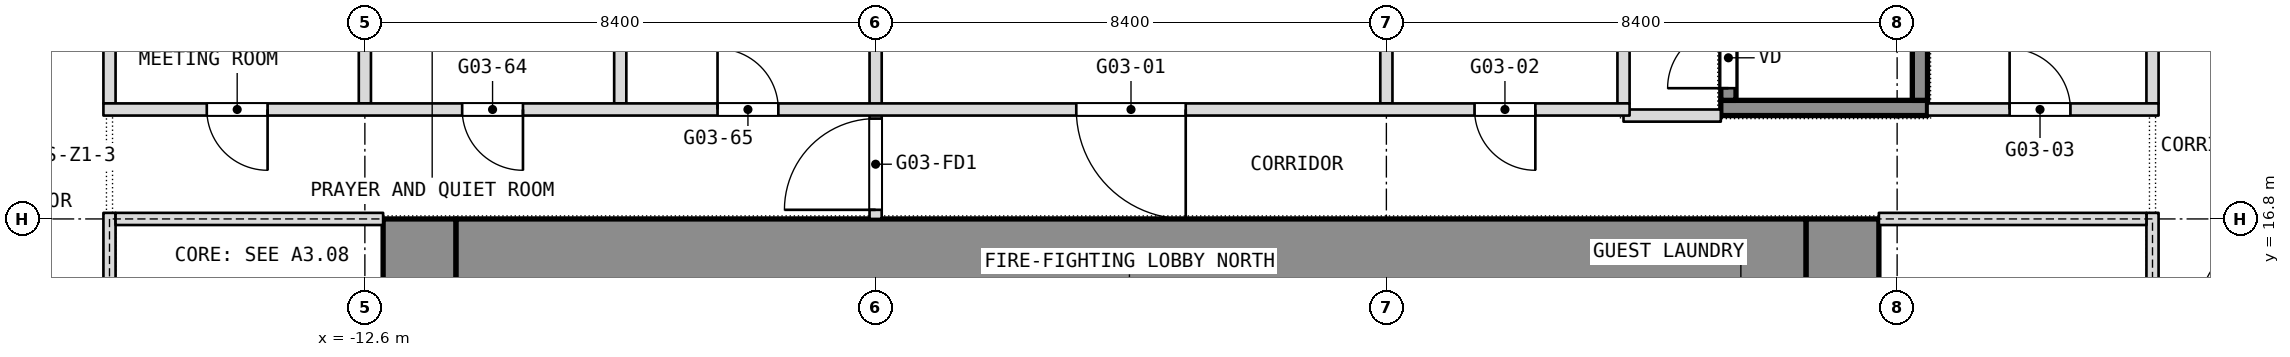
"""IFC4 building model, lengths in metres.
Left out: names, types, materials, properties, quantities, classifications, styles, units other than length and angle.
Written with IfcOpenShell. Run it as: python <this file> out.ifc"""

import sys

from ifc_helpers import new_model, si_unit, direction, frame, frame_2d, origin, place, context, subcontext, project, spatial, rectangle, extrude, element, fill, save


model = new_model("IFC4")
c1 = context("Model", 3, precision=1e-05, world=origin(), true_north=direction((0.0, 1.0)))
c2 = subcontext(c1, "Body", "Model", "MODEL_VIEW")
j1 = project(units=[si_unit("LENGTHUNIT", "METRE"), si_unit("PLANEANGLEUNIT", "RADIAN")], contexts=[c1])
p1 = place(None, origin())
s1 = spatial("IfcSite", under=j1, at=p1, CompositionType="ELEMENT")
p2 = place(p1, origin())
s2 = spatial("IfcBuilding", under=s1, at=p2, CompositionType="ELEMENT")
p3 = place(p2, frame((0.0, 0.0, 50.9)))
s3 = spatial("IfcBuildingStorey", under=s2, at=p3, CompositionType="ELEMENT", Elevation=50.9)
p4 = place(p3, frame((11.7, 0.0, 0.0), z_axis=(0.0, 0.0, 1.0), x_axis=(0.0, 1.0, 0.0)))
e1 = element("IfcWall", 1, at=p4, inside=s3, PredefinedType="SHEAR", context=c2, shape_type="SweptSolid", body=[
    extrude(rectangle(XDim=16.8, YDim=1.2, at=frame_2d((8.4, 0.0))), origin(), (0.0, 0.0, 1.0), 3.6),
])
p5 = place(p4, frame((3.6, 0.0, 0.0)))
e2 = element("IfcOpeningElement", 2, at=p5, cuts=e1, PredefinedType="OPENING", context=c2, shape_type="SweptSolid", body=[
    extrude(rectangle(XDim=0.9, YDim=2.1, at=frame_2d((0.45, 1.05))), frame((0.0, 0.6, 0.0), z_axis=(0.0, -1.0, 0.0), x_axis=(1.0, 0.0, 0.0)), (0.0, 0.0, 1.0), 1.2),
])
p6 = place(p4, frame((6.825, 0.0, 0.0)))
e3 = element("IfcOpeningElement", 3, at=p6, cuts=e1, PredefinedType="OPENING", context=c2, shape_type="SweptSolid", body=[
    extrude(rectangle(XDim=1.2, YDim=2.1, at=frame_2d((0.6, 1.05))), frame((0.0, 0.6, 0.0), z_axis=(0.0, -1.0, 0.0), x_axis=(1.0, 0.0, 0.0)), (0.0, 0.0, 1.0), 1.2),
])
p7 = place(p4, frame((12.3, 0.0, 0.0)))
e4 = element("IfcOpeningElement", 4, at=p7, cuts=e1, PredefinedType="OPENING", context=c2, shape_type="SweptSolid", body=[
    extrude(rectangle(XDim=0.9, YDim=2.1, at=frame_2d((0.45, 1.05))), frame((0.0, 0.6, 0.0), z_axis=(0.0, -1.0, 0.0), x_axis=(1.0, 0.0, 0.0)), (0.0, 0.0, 1.0), 1.2),
])
p8 = place(p4, frame((8.775, 0.0, 0.0)))
e5 = element("IfcOpeningElement", 5, at=p8, cuts=e1, PredefinedType="OPENING", context=c2, shape_type="SweptSolid", body=[
    extrude(rectangle(XDim=1.2, YDim=2.1, at=frame_2d((0.6, 1.05))), frame((0.0, 0.6, 0.0), z_axis=(0.0, -1.0, 0.0), x_axis=(1.0, 0.0, 0.0)), (0.0, 0.0, 1.0), 1.2),
])
p9 = place(p3, frame((-11.7, 0.0, 0.0), z_axis=(0.0, 0.0, 1.0), x_axis=(0.0, 1.0, 0.0)))
e6 = element("IfcWall", 6, at=p9, inside=s3, PredefinedType="SHEAR", context=c2, shape_type="SweptSolid", body=[
    extrude(rectangle(XDim=16.8, YDim=1.2, at=frame_2d((8.4, 0.0))), origin(), (0.0, 0.0, 1.0), 3.6),
])
p10 = place(p9, frame((2.3, 0.0, 0.0)))
e7 = element("IfcOpeningElement", 7, at=p10, cuts=e6, PredefinedType="OPENING", context=c2, shape_type="SweptSolid", body=[
    extrude(rectangle(XDim=1.1, YDim=2.1, at=frame_2d((0.55, 1.05))), frame((0.0, 0.6, 0.0), z_axis=(0.0, -1.0, 0.0), x_axis=(1.0, 0.0, 0.0)), (0.0, 0.0, 1.0), 1.2),
])
p11 = place(p9, frame((4.85, 0.0, 0.0)))
e8 = element("IfcOpeningElement", 8, at=p11, cuts=e6, PredefinedType="OPENING", context=c2, shape_type="SweptSolid", body=[
    extrude(rectangle(XDim=1.1, YDim=2.1, at=frame_2d((0.55, 1.05))), frame((0.0, 0.6, 0.0), z_axis=(0.0, -1.0, 0.0), x_axis=(1.0, 0.0, 0.0)), (0.0, 0.0, 1.0), 1.2),
])
p12 = place(p9, frame((6.825, 0.0, 0.0)))
e9 = element("IfcOpeningElement", 9, at=p12, cuts=e6, PredefinedType="OPENING", context=c2, shape_type="SweptSolid", body=[
    extrude(rectangle(XDim=1.2, YDim=2.1, at=frame_2d((0.6, 1.05))), frame((0.0, 0.6, 0.0), z_axis=(0.0, -1.0, 0.0), x_axis=(1.0, 0.0, 0.0)), (0.0, 0.0, 1.0), 1.2),
])
p13 = place(p9, frame((13.4, 0.0, 0.0)))
e10 = element("IfcOpeningElement", 10, at=p13, cuts=e6, PredefinedType="OPENING", context=c2, shape_type="SweptSolid", body=[
    extrude(rectangle(XDim=1.1, YDim=2.1, at=frame_2d((0.55, 1.05))), frame((0.0, 0.6, 0.0), z_axis=(0.0, -1.0, 0.0), x_axis=(1.0, 0.0, 0.0)), (0.0, 0.0, 1.0), 1.2),
])
p14 = place(p9, frame((10.85, 0.0, 0.0)))
e11 = element("IfcOpeningElement", 11, at=p14, cuts=e6, PredefinedType="OPENING", context=c2, shape_type="SweptSolid", body=[
    extrude(rectangle(XDim=1.1, YDim=2.1, at=frame_2d((0.55, 1.05))), frame((0.0, 0.6, 0.0), z_axis=(0.0, -1.0, 0.0), x_axis=(1.0, 0.0, 0.0)), (0.0, 0.0, 1.0), 1.2),
])
p15 = place(p9, frame((8.775, 0.0, 0.0)))
e12 = element("IfcOpeningElement", 12, at=p15, cuts=e6, PredefinedType="OPENING", context=c2, shape_type="SweptSolid", body=[
    extrude(rectangle(XDim=1.2, YDim=2.1, at=frame_2d((0.6, 1.05))), frame((0.0, 0.6, 0.0), z_axis=(0.0, -1.0, 0.0), x_axis=(1.0, 0.0, 0.0)), (0.0, 0.0, 1.0), 1.2),
])
p16 = place(p3, frame((-11.1, 16.2, 0.0), z_axis=(0.0, 0.0, 1.0), x_axis=(1.0, 0.0, 0.0)))
e13 = element("IfcWall", 13, at=p16, inside=s3, PredefinedType="SHEAR", context=c2, shape_type="SweptSolid", body=[
    extrude(rectangle(XDim=22.2, YDim=1.2, at=frame_2d((11.1, 0.0))), origin(), (0.0, 0.0, 1.0), 3.6),
])
p17 = place(p3, frame((16.8, 18.7, 0.0), z_axis=(0.0, 0.0, 1.0), x_axis=(0.0, 1.0, 0.0)))
e14 = element("IfcWall", 14, at=p17, inside=s3, PredefinedType="PARTITIONING", context=c2, shape_type="SweptSolid", body=[
    extrude(rectangle(XDim=3.0, YDim=0.2, at=frame_2d((1.5, 0.0))), origin(), (0.0, 0.0, 1.0), 3.34),
])
for number, where, z_axis, x_axis in (
    (15, (8.1, 18.7, 0.0), (0.0, 0.0, 1.0), (0.0, 1.0, 0.0)),
    (16, (4.2, 18.7, 0.0), (0.0, 0.0, 1.0), (0.0, 1.0, 0.0)),
):
    element("IfcWall", number, at=place(p3, frame(where, z_axis=z_axis, x_axis=x_axis)), inside=s3, PredefinedType="PARTITIONING", context=c2, shape_type="SweptSolid", body=[
        extrude(rectangle(XDim=2.8, YDim=0.2, at=frame_2d((1.4, 0.0))), origin(), (0.0, 0.0, 1.0), 3.34),
    ])
p18 = place(p3, frame((-4.2, 16.8, 0.0), z_axis=(0.0, 0.0, 1.0), x_axis=(0.0, 1.0, 0.0)))
e17 = element("IfcWall", 17, at=p18, inside=s3, PredefinedType="PARTITIONING", context=c2, shape_type="SweptSolid", body=[
    extrude(rectangle(XDim=6.7, YDim=0.2, at=frame_2d((3.35, 0.0))), origin(), (0.0, 0.0, 1.0), 3.34),
])
p19 = place(p18, frame((0.15, 0.0, 0.0)))
e18 = element("IfcOpeningElement", 18, at=p19, cuts=e17, PredefinedType="OPENING", context=c2, shape_type="SweptSolid", body=[
    extrude(rectangle(XDim=1.5, YDim=2.1, at=frame_2d((0.75, 1.05))), frame((0.0, 0.1, 0.0), z_axis=(0.0, -1.0, 0.0), x_axis=(1.0, 0.0, 0.0)), (0.0, 0.0, 1.0), 0.2),
])
p20 = place(p18, frame((4.95, 0.0, 0.0)))
e19 = element("IfcOpeningElement", 19, at=p20, cuts=e17, PredefinedType="OPENING", context=c2, shape_type="SweptSolid", body=[
    extrude(rectangle(XDim=1.5, YDim=2.1, at=frame_2d((0.75, 1.05))), frame((0.0, 0.1, 0.0), z_axis=(0.0, -1.0, 0.0), x_axis=(1.0, 0.0, 0.0)), (0.0, 0.0, 1.0), 0.2),
])
for number, where, z_axis, x_axis in (
    (20, (-8.4, 18.7, 0.0), (0.0, 0.0, 1.0), (0.0, 1.0, 0.0)),
    (21, (-12.6, 18.7, 0.0), (0.0, 0.0, 1.0), (0.0, 1.0, 0.0)),
):
    element("IfcWall", number, at=place(p3, frame(where, z_axis=z_axis, x_axis=x_axis)), inside=s3, PredefinedType="PARTITIONING", context=c2, shape_type="SweptSolid", body=[
        extrude(rectangle(XDim=2.8, YDim=0.2, at=frame_2d((1.4, 0.0))), origin(), (0.0, 0.0, 1.0), 3.34),
    ])
p21 = place(p3, frame((-16.8, 18.7, 0.0), z_axis=(0.0, 0.0, 1.0), x_axis=(0.0, 1.0, 0.0)))
e22 = element("IfcWall", 22, at=p21, inside=s3, PredefinedType="PARTITIONING", context=c2, shape_type="SweptSolid", body=[
    extrude(rectangle(XDim=3.0, YDim=0.2, at=frame_2d((1.5, 0.0))), origin(), (0.0, 0.0, 1.0), 3.34),
])
p22 = place(p3, frame((8.1, 18.5, 0.0), z_axis=(0.0, 0.0, 1.0), x_axis=(1.0, 0.0, 0.0)))
e23 = element("IfcWall", 23, at=p22, inside=s3, PredefinedType="PARTITIONING", context=c2, shape_type="SweptSolid", body=[
    extrude(rectangle(XDim=1.6, YDim=0.2, at=frame_2d((0.8, 0.0))), origin(), (0.0, 0.0, 1.0), 3.34),
])
p23 = place(p3, frame((-16.9, 18.6, 0.0), z_axis=(0.0, 0.0, 1.0), x_axis=(1.0, 0.0, 0.0)))
e24 = element("IfcWall", 24, at=p23, inside=s3, PredefinedType="PARTITIONING", context=c2, shape_type="SweptSolid", body=[
    extrude(rectangle(XDim=25.1, YDim=0.2, at=frame_2d((12.55, 0.0))), origin(), (0.0, 0.0, 1.0), 3.34),
])
p24 = place(p23, frame((16.0, 0.0, 0.0)))
e25 = element("IfcOpeningElement", 25, at=p24, cuts=e24, PredefinedType="OPENING", context=c2, shape_type="SweptSolid", body=[
    extrude(rectangle(XDim=1.8, YDim=2.1, at=frame_2d((0.9, 1.05))), frame((0.0, 0.1, 0.0), z_axis=(0.0, -1.0, 0.0), x_axis=(1.0, 0.0, 0.0)), (0.0, 0.0, 1.0), 0.2),
])
p25 = place(p23, frame((22.55, 0.0, 0.0)))
e26 = element("IfcOpeningElement", 26, at=p25, cuts=e24, PredefinedType="OPENING", context=c2, shape_type="SweptSolid", body=[
    extrude(rectangle(XDim=1.0, YDim=2.1, at=frame_2d((0.5, 1.05))), frame((0.0, 0.1, 0.0), z_axis=(0.0, -1.0, 0.0), x_axis=(1.0, 0.0, 0.0)), (0.0, 0.0, 1.0), 0.2),
])
p26 = place(p23, frame((5.9, 0.0, 0.0)))
e27 = element("IfcOpeningElement", 27, at=p26, cuts=e24, PredefinedType="OPENING", context=c2, shape_type="SweptSolid", body=[
    extrude(rectangle(XDim=1.0, YDim=2.1, at=frame_2d((0.5, 1.05))), frame((0.0, 0.1, 0.0), z_axis=(0.0, -1.0, 0.0), x_axis=(1.0, 0.0, 0.0)), (0.0, 0.0, 1.0), 0.2),
])
p27 = place(p23, frame((10.1, 0.0, 0.0)))
e28 = element("IfcOpeningElement", 28, at=p27, cuts=e24, PredefinedType="OPENING", context=c2, shape_type="SweptSolid", body=[
    extrude(rectangle(XDim=1.0, YDim=2.1, at=frame_2d((0.5, 1.05))), frame((0.0, 0.1, 0.0), z_axis=(0.0, -1.0, 0.0), x_axis=(1.0, 0.0, 0.0)), (0.0, 0.0, 1.0), 0.2),
])
p28 = place(p23, frame((1.7, 0.0, 0.0)))
e29 = element("IfcOpeningElement", 29, at=p28, cuts=e24, PredefinedType="OPENING", context=c2, shape_type="SweptSolid", body=[
    extrude(rectangle(XDim=1.0, YDim=2.1, at=frame_2d((0.5, 1.05))), frame((0.0, 0.1, 0.0), z_axis=(0.0, -1.0, 0.0), x_axis=(1.0, 0.0, 0.0)), (0.0, 0.0, 1.0), 0.2),
])
p29 = place(p3, frame((13.1, 18.6, 0.0), z_axis=(0.0, 0.0, 1.0), x_axis=(1.0, 0.0, 0.0)))
e30 = element("IfcWall", 30, at=p29, inside=s3, PredefinedType="PARTITIONING", context=c2, shape_type="SweptSolid", body=[
    extrude(rectangle(XDim=3.8, YDim=0.2, at=frame_2d((1.9, 0.0))), origin(), (0.0, 0.0, 1.0), 3.34),
])
p30 = place(p29, frame((1.35, 0.0, 0.0)))
e31 = element("IfcOpeningElement", 31, at=p30, cuts=e30, PredefinedType="OPENING", context=c2, shape_type="SweptSolid", body=[
    extrude(rectangle(XDim=1.0, YDim=2.1, at=frame_2d((0.5, 1.05))), frame((0.0, 0.1, 0.0), z_axis=(0.0, -1.0, 0.0), x_axis=(1.0, 0.0, 0.0)), (0.0, 0.0, 1.0), 0.2),
])
p31 = place(p3, frame((-16.8, -0.1, 0.0), z_axis=(0.0, 0.0, 1.0), x_axis=(0.0, 1.0, 0.0)))
e32 = element("IfcWall", 32, at=p31, inside=s3, PredefinedType="PARTITIONING", context=c2, shape_type="SweptSolid", body=[
    extrude(rectangle(XDim=17.0, YDim=0.2, at=frame_2d((8.5, 0.0))), origin(), (0.0, 0.0, 1.0), 3.34),
])
p32 = place(p31, frame((2.2, 0.0, 0.0)))
e33 = element("IfcOpeningElement", 33, at=p32, cuts=e32, PredefinedType="OPENING", context=c2, shape_type="SweptSolid", body=[
    extrude(rectangle(XDim=1.8, YDim=2.1, at=frame_2d((0.9, 1.05))), frame((0.0, 0.1, 0.0), z_axis=(0.0, -1.0, 0.0), x_axis=(1.0, 0.0, 0.0)), (0.0, 0.0, 1.0), 0.2),
])
p33 = place(p31, frame((7.2, 0.0, 0.0)))
e34 = element("IfcOpeningElement", 34, at=p33, cuts=e32, PredefinedType="OPENING", context=c2, shape_type="SweptSolid", body=[
    extrude(rectangle(XDim=1.8, YDim=2.1, at=frame_2d((0.9, 1.05))), frame((0.0, 0.1, 0.0), z_axis=(0.0, -1.0, 0.0), x_axis=(1.0, 0.0, 0.0)), (0.0, 0.0, 1.0), 0.2),
])
p34 = place(p3, frame((-16.7, 16.8, 0.0), z_axis=(0.0, 0.0, 1.0), x_axis=(1.0, 0.0, 0.0)))
e35 = element("IfcWall", 35, at=p34, inside=s3, PredefinedType="PARTITIONING", context=c2, shape_type="SweptSolid", body=[
    extrude(rectangle(XDim=4.4, YDim=0.2, at=frame_2d((2.2, 0.0))), origin(), (0.0, 0.0, 1.0), 2.84),
])
p35 = place(p3, frame((16.8, -0.1, 0.0), z_axis=(0.0, 0.0, 1.0), x_axis=(0.0, 1.0, 0.0)))
e36 = element("IfcWall", 36, at=p35, inside=s3, PredefinedType="PARTITIONING", context=c2, shape_type="SweptSolid", body=[
    extrude(rectangle(XDim=17.0, YDim=0.2, at=frame_2d((8.5, 0.0))), origin(), (0.0, 0.0, 1.0), 3.34),
])
p36 = place(p35, frame((2.2, 0.0, 0.0)))
e37 = element("IfcOpeningElement", 37, at=p36, cuts=e36, PredefinedType="OPENING", context=c2, shape_type="SweptSolid", body=[
    extrude(rectangle(XDim=1.8, YDim=2.1, at=frame_2d((0.9, 1.05))), frame((0.0, 0.1, 0.0), z_axis=(0.0, -1.0, 0.0), x_axis=(1.0, 0.0, 0.0)), (0.0, 0.0, 1.0), 0.2),
])
p37 = place(p35, frame((13.0, 0.0, 0.0)))
e38 = element("IfcOpeningElement", 38, at=p37, cuts=e36, PredefinedType="OPENING", context=c2, shape_type="SweptSolid", body=[
    extrude(rectangle(XDim=1.8, YDim=2.1, at=frame_2d((0.9, 1.05))), frame((0.0, 0.1, 0.0), z_axis=(0.0, -1.0, 0.0), x_axis=(1.0, 0.0, 0.0)), (0.0, 0.0, 1.0), 0.2),
])
p38 = place(p3, frame((12.3, 16.8, 0.0), z_axis=(0.0, 0.0, 1.0), x_axis=(1.0, 0.0, 0.0)))
e39 = element("IfcWall", 39, at=p38, inside=s3, PredefinedType="PARTITIONING", context=c2, shape_type="SweptSolid", body=[
    extrude(rectangle(XDim=4.4, YDim=0.2, at=frame_2d((2.2, 0.0))), origin(), (0.0, 0.0, 1.0), 2.84),
])
p39 = place(p3, frame((9.7, 18.625, 0.1), z_axis=(0.0, 0.0, 1.0), x_axis=(1.0, 0.0, 0.0)))
e40 = element("IfcWall", 40, at=p39, inside=s3, PredefinedType="SHEAR", context=c2, shape_type="SweptSolid", body=[
    extrude(rectangle(XDim=3.4, YDim=0.25, at=frame_2d((1.7, 0.0))), origin(), (0.0, 0.0, 1.0), 3.6),
])
p40 = place(p3, frame((9.825, 18.75, 0.1), z_axis=(0.0, 0.0, 1.0), x_axis=(0.0, 1.0, 0.0)))
e41 = element("IfcWall", 41, at=p40, inside=s3, PredefinedType="SHEAR", context=c2, shape_type="SweptSolid", body=[
    extrude(rectangle(XDim=5.7, YDim=0.25, at=frame_2d((2.85, 0.0))), origin(), (0.0, 0.0, 1.0), 3.6),
])
p41 = place(p40, frame((0.2, 0.0, 0.0)))
e42 = element("IfcOpeningElement", 42, at=p41, cuts=e41, PredefinedType="OPENING", context=c2, shape_type="SweptSolid", body=[
    extrude(rectangle(XDim=1.0, YDim=2.1, at=frame_2d((0.5, 1.05))), frame((0.0, 0.125, 0.0), z_axis=(0.0, -1.0, 0.0), x_axis=(1.0, 0.0, 0.0)), (0.0, 0.0, 1.0), 0.25),
])
p42 = place(p3, frame((12.975, 18.75, 0.1), z_axis=(0.0, 0.0, 1.0), x_axis=(0.0, 1.0, 0.0)))
e43 = element("IfcWall", 43, at=p42, inside=s3, PredefinedType="SHEAR", context=c2, shape_type="SweptSolid", body=[
    extrude(rectangle(XDim=5.7, YDim=0.25, at=frame_2d((2.85, 0.0))), origin(), (0.0, 0.0, 1.0), 3.6),
])
p43 = place(p24, origin())
e44 = element("IfcDoor", 44, at=p43, inside=s3, OperationType="DOUBLE_DOOR_SINGLE_SWING", PredefinedType="DOOR", context=c2, shape_type="SweptSolid", body=[
    extrude(rectangle(XDim=1.8, YDim=2.1, at=frame_2d((0.9, 1.05))), frame((0.0, 0.025, 0.0), z_axis=(0.0, -1.0, 0.0), x_axis=(1.0, 0.0, 0.0)), (0.0, 0.0, 1.0), 0.05),
])
fill(e25, e44)
p44 = place(p25, origin())
e45 = element("IfcDoor", 45, at=p44, inside=s3, OperationType="SINGLE_SWING_RIGHT", PredefinedType="DOOR", context=c2, shape_type="SweptSolid", body=[
    extrude(rectangle(XDim=1.0, YDim=2.1, at=frame_2d((0.5, 1.05))), frame((0.0, 0.025, 0.0), z_axis=(0.0, -1.0, 0.0), x_axis=(1.0, 0.0, 0.0)), (0.0, 0.0, 1.0), 0.05),
])
fill(e26, e45)
p45 = place(p26, origin())
e46 = element("IfcDoor", 46, at=p45, inside=s3, OperationType="SINGLE_SWING_RIGHT", PredefinedType="DOOR", context=c2, shape_type="SweptSolid", body=[
    extrude(rectangle(XDim=1.0, YDim=2.1, at=frame_2d((0.5, 1.05))), frame((0.0, 0.025, 0.0), z_axis=(0.0, -1.0, 0.0), x_axis=(1.0, 0.0, 0.0)), (0.0, 0.0, 1.0), 0.05),
])
fill(e27, e46)
p46 = place(p27, origin())
e47 = element("IfcDoor", 47, at=p46, inside=s3, OperationType="SINGLE_SWING_LEFT", PredefinedType="DOOR", context=c2, shape_type="SweptSolid", body=[
    extrude(rectangle(XDim=1.0, YDim=2.1, at=frame_2d((0.5, 1.05))), frame((0.0, 0.025, 0.0), z_axis=(0.0, -1.0, 0.0), x_axis=(1.0, 0.0, 0.0)), (0.0, 0.0, 1.0), 0.05),
])
fill(e28, e47)
p47 = place(p28, origin())
e48 = element("IfcDoor", 48, at=p47, inside=s3, OperationType="SINGLE_SWING_RIGHT", PredefinedType="DOOR", context=c2, shape_type="SweptSolid", body=[
    extrude(rectangle(XDim=1.0, YDim=2.1, at=frame_2d((0.5, 1.05))), frame((0.0, 0.025, 0.0), z_axis=(0.0, -1.0, 0.0), x_axis=(1.0, 0.0, 0.0)), (0.0, 0.0, 1.0), 0.05),
])
fill(e29, e48)
p48 = place(p30, origin())
e49 = element("IfcDoor", 49, at=p48, inside=s3, OperationType="SINGLE_SWING_LEFT", PredefinedType="DOOR", context=c2, shape_type="SweptSolid", body=[
    extrude(rectangle(XDim=1.0, YDim=2.1, at=frame_2d((0.5, 1.05))), frame((0.0, 0.025, 0.0), z_axis=(0.0, -1.0, 0.0), x_axis=(1.0, 0.0, 0.0)), (0.0, 0.0, 1.0), 0.05),
])
fill(e31, e49)
p49 = place(p41, origin())
e50 = element("IfcDoor", 50, at=p49, inside=s3, OperationType="SINGLE_SWING_LEFT", PredefinedType="DOOR", context=c2, shape_type="SweptSolid", body=[
    extrude(rectangle(XDim=1.0, YDim=2.1, at=frame_2d((0.5, 1.05))), frame((0.0, 0.025, 0.0), z_axis=(0.0, -1.0, 0.0), x_axis=(1.0, 0.0, 0.0)), (0.0, 0.0, 1.0), 0.05),
])
fill(e42, e50)
p50 = place(p19, origin())
e51 = element("IfcDoor", 51, at=p50, inside=s3, OperationType="DOUBLE_DOOR_DOUBLE_SWING", PredefinedType="DOOR", context=c2, shape_type="SweptSolid", body=[
    extrude(rectangle(XDim=1.5, YDim=2.1, at=frame_2d((0.75, 1.05))), frame((0.0, 0.025, 0.0), z_axis=(0.0, -1.0, 0.0), x_axis=(1.0, 0.0, 0.0)), (0.0, 0.0, 1.0), 0.05),
])
fill(e18, e51)
save(model, sys.argv[1])
